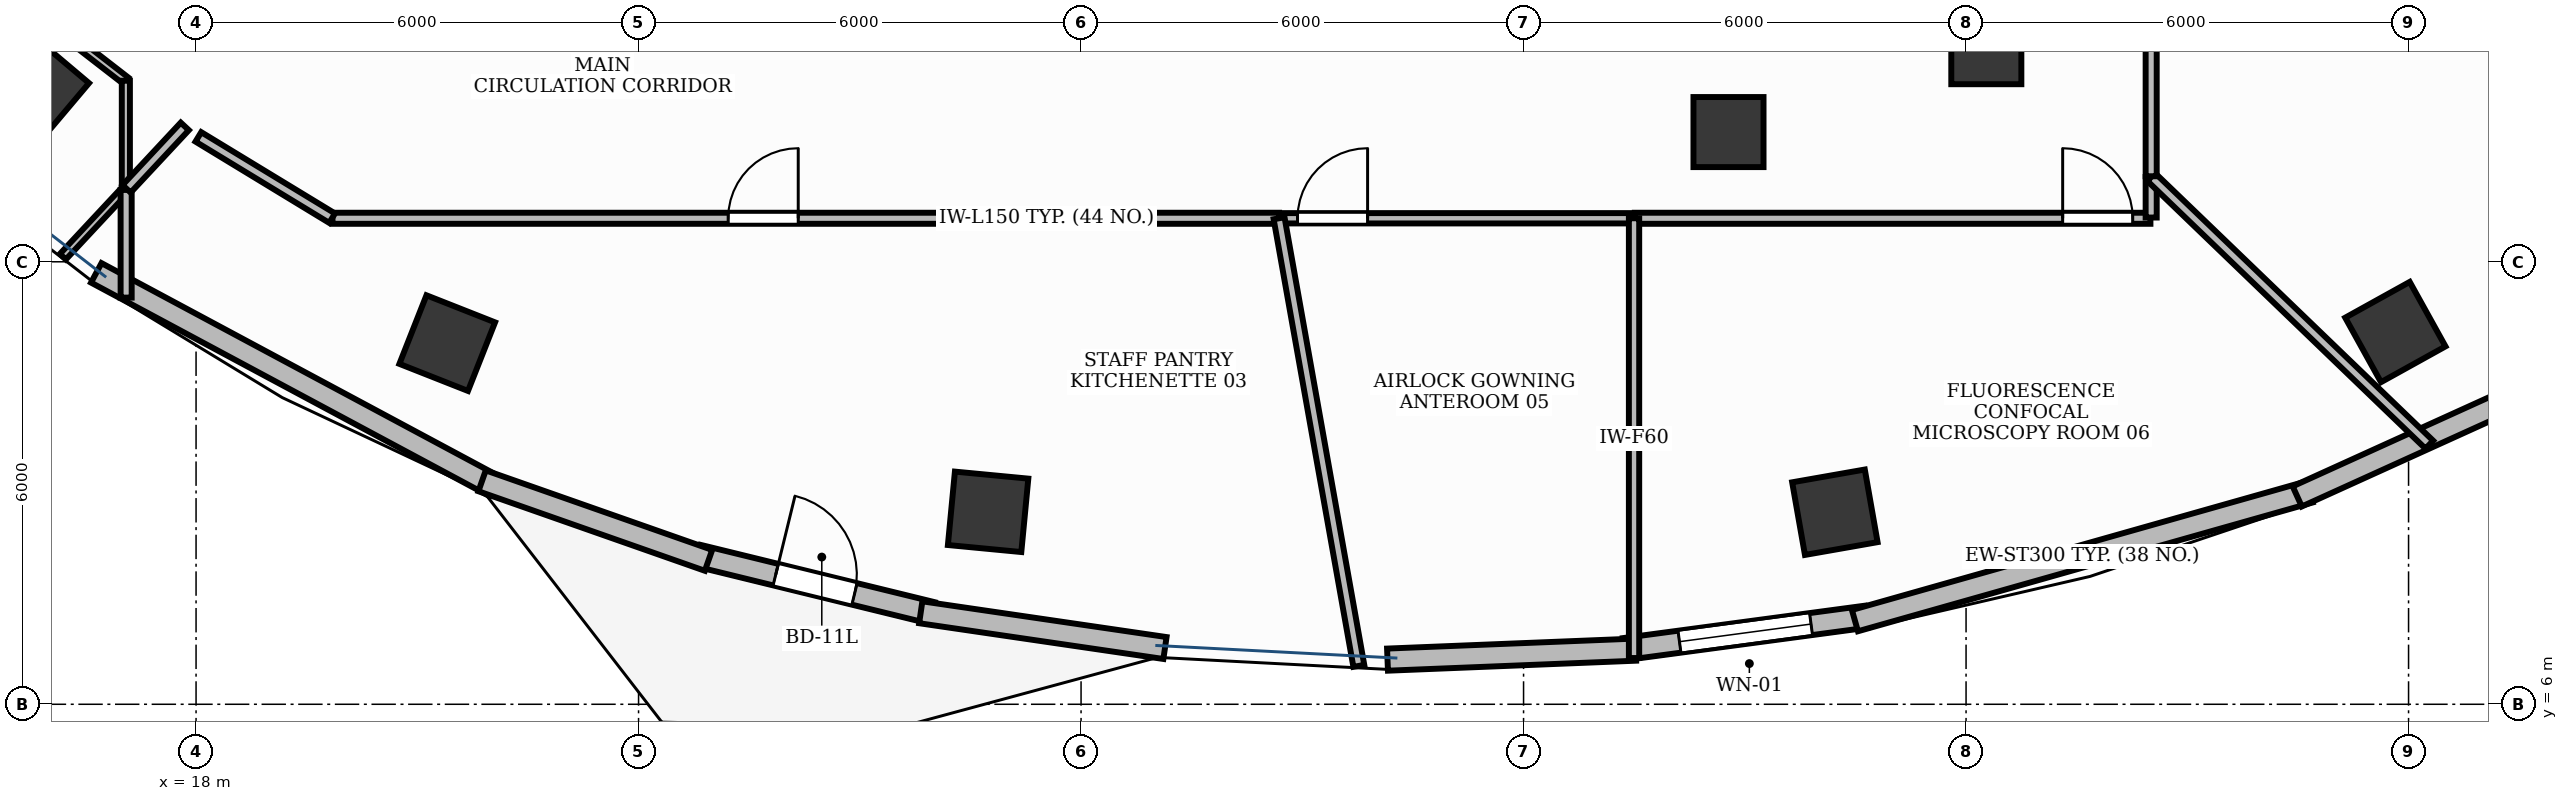
"""IFC4 building model, lengths in metres.
Left out: names, types, materials, properties, quantities, classifications, styles, units other than length and angle.
Written with IfcOpenShell. Run it as: python <this file> out.ifc"""

import sys

from ifc_helpers import new_model, si_unit, direction, frame, frame_2d, origin, origin_2d, place, context, subcontext, project, spatial, rectangle, extrude, element, fill, save


model = new_model("IFC4")
c1 = context("Model", 3, precision=1e-05, world=origin(), true_north=direction((0.0, 1.0)))
c2 = subcontext(c1, "Body", "Model", "MODEL_VIEW")
j1 = project(units=[si_unit("LENGTHUNIT", "METRE"), si_unit("PLANEANGLEUNIT", "RADIAN")], contexts=[c1])
p1 = place(None, origin())
s1 = spatial("IfcSite", under=j1, at=p1, CompositionType="ELEMENT")
p2 = place(p1, origin())
s2 = spatial("IfcBuilding", under=s1, at=p2, CompositionType="ELEMENT")
p3 = place(p2, frame((0.0, 0.0, 158.4)))
s3 = spatial("IfcBuildingStorey", under=s2, at=p3, CompositionType="ELEMENT", Elevation=158.4)
for number, where, z_axis, x_axis in (
    (1, (15.844, 14.363, -0.0), (0.0, 0.0, 1.0), (-0.764, 0.645, 0.0)),
    (2, (21.406, 10.897, -0.0), (0.0, 0.0, 1.0), (-0.93, 0.367, 0.0)),
    (3, (28.74, 8.61, -0.0), (0.0, 0.0, 1.0), (-0.995, 0.095, 0.0)),
    (4, (40.221, 8.604, -0.0), (0.0, 0.0, 1.0), (0.985, 0.173, 0.0)),
):
    element("IfcColumn", number, at=place(p3, frame(where, z_axis=z_axis, x_axis=x_axis)), inside=s3, PredefinedType="COLUMN", context=c2, shape_type="SweptSolid", body=[
        extrude(rectangle(XDim=1.0, YDim=1.0, at=origin_2d()), origin(), (0.0, 0.0, 1.0), 3.901),
    ])
p4 = place(p3, frame((38.779, 13.759, -0.0), z_axis=(0.0, 0.0, 1.0), x_axis=(1.0, 0.0, 0.0)))
e5 = element("IfcColumn", 5, at=p4, inside=s3, PredefinedType="COLUMN", context=c2, shape_type="SweptSolid", body=[
    extrude(rectangle(XDim=0.95, YDim=0.95, at=origin_2d()), origin(), (0.0, 0.0, 1.0), 3.901),
])
p5 = place(p3, frame((47.821, 11.047, -0.0), z_axis=(0.0, 0.0, 1.0), x_axis=(0.874535078577, 0.484962262797, 0.0)))
e6 = element("IfcColumn", 6, at=p5, inside=s3, PredefinedType="COLUMN", context=c2, shape_type="SweptSolid", body=[
    extrude(rectangle(XDim=1.0, YDim=1.0, at=origin_2d()), origin(), (0.0, 0.0, 1.0), 3.901),
])
p6 = place(p3, frame((42.275, 14.883, -0.0), z_axis=(0.0, 0.0, 1.0), x_axis=(1.0, 0.0, 0.0)))
e7 = element("IfcColumn", 7, at=p6, inside=s3, PredefinedType="COLUMN", context=c2, shape_type="SweptSolid", body=[
    extrude(rectangle(XDim=0.95, YDim=0.95, at=origin_2d()), origin(), (0.0, 0.0, 1.0), 3.901),
])
p7 = place(p3, frame((24.807, 8.016, 0.0), z_axis=(0.0, 0.0, 1.0), x_axis=(0.971312804689, -0.237805457142, 0.0)))
e8 = element("IfcWall", 8, at=p7, inside=s3, PredefinedType="STANDARD", context=c2, shape_type="SweptSolid", body=[
    extrude(rectangle(XDim=3.269, YDim=0.3, at=frame_2d((1.634, 0.0))), origin(), (0.0, 0.0, 1.0), 3.9),
])
p8 = place(p7, frame((1.084, 0.0, 0.0)))
e9 = element("IfcOpeningElement", 9, at=p8, cuts=e8, PredefinedType="OPENING", context=c2, shape_type="SweptSolid", body=[
    extrude(rectangle(XDim=1.1, YDim=2.15, at=frame_2d((0.55, 1.075))), frame((0.0, 0.165, 0.0), z_axis=(0.0, -1.0, 0.0), x_axis=(1.0, 0.0, 0.0)), (0.0, 0.0, 1.0), 0.33),
])
p9 = place(p3, frame((37.365, 6.748, 0.0), z_axis=(0.0, 0.0, 1.0), x_axis=(0.991139436205, 0.132825517122, 0.0)))
e10 = element("IfcWall", 10, at=p9, inside=s3, PredefinedType="STANDARD", context=c2, shape_type="SweptSolid", body=[
    extrude(rectangle(XDim=3.31, YDim=0.3, at=frame_2d((1.655, 0.0))), origin(), (0.0, 0.0, 1.0), 3.9),
])
p10 = place(p9, frame((0.755, 0.0, 0.9)))
e11 = element("IfcOpeningElement", 11, at=p10, cuts=e10, PredefinedType="OPENING", context=c2, shape_type="SweptSolid", body=[
    extrude(rectangle(XDim=1.8, YDim=2.1, at=frame_2d((0.9, 1.05))), frame((0.0, 0.165, 0.0), z_axis=(0.0, -1.0, 0.0), x_axis=(1.0, 0.0, 0.0)), (0.0, 0.0, 1.0), 0.33),
])
p11 = place(p3, frame((16.647, 11.85, 0.0), z_axis=(0.0, 0.0, 1.0), x_axis=(0.881364369565, -0.472437136624, 0.0)))
e12 = element("IfcWall", 12, at=p11, inside=s3, PredefinedType="STANDARD", context=c2, shape_type="SweptSolid", body=[
    extrude(rectangle(XDim=6.124, YDim=0.3, at=frame_2d((3.062, 0.0))), origin(), (0.0, 0.0, 1.0), 3.47),
])
p12 = place(p3, frame((21.878, 9.03, 0.0), z_axis=(0.0, 0.0, 1.0), x_axis=(0.94352100271, -0.331312718509, 0.0)))
e13 = element("IfcWall", 13, at=p12, inside=s3, PredefinedType="STANDARD", context=c2, shape_type="SweptSolid", body=[
    extrude(rectangle(XDim=3.254, YDim=0.3, at=frame_2d((1.627, 0.0))), origin(), (0.0, 0.0, 1.0), 3.47),
])
p13 = place(p3, frame((27.826, 7.247, 0.0), z_axis=(0.0, 0.0, 1.0), x_axis=(0.98945927954, -0.144811374319, 0.0)))
e14 = element("IfcWall", 14, at=p13, inside=s3, PredefinedType="STANDARD", context=c2, shape_type="SweptSolid", body=[
    extrude(rectangle(XDim=3.346, YDim=0.3, at=frame_2d((1.673, 0.0))), origin(), (0.0, 0.0, 1.0), 3.47),
])
p14 = place(p3, frame((34.155, 6.605, 0.0), z_axis=(0.0, 0.0, 1.0), x_axis=(0.999190386434, 0.040231475948, 0.0)))
e15 = element("IfcWall", 15, at=p14, inside=s3, PredefinedType="STANDARD", context=c2, shape_type="SweptSolid", body=[
    extrude(rectangle(XDim=3.368, YDim=0.3, at=frame_2d((1.684, 0.0))), origin(), (0.0, 0.0, 1.0), 3.9),
])
p15 = place(p3, frame((40.493, 7.134, 0.0), z_axis=(0.0, 0.0, 1.0), x_axis=(0.962163849422, 0.272471515694, 0.0)))
e16 = element("IfcWall", 16, at=p15, inside=s3, PredefinedType="STANDARD", context=c2, shape_type="SweptSolid", body=[
    extrude(rectangle(XDim=6.409, YDim=0.3, at=frame_2d((3.205, 0.0))), origin(), (0.0, 0.0, 1.0), 3.9),
])
p16 = place(p3, frame((46.49, 8.818, 0.0), z_axis=(0.0, 0.0, 1.0), x_axis=(0.910633193525, 0.413215666268, 0.0)))
e17 = element("IfcWall", 17, at=p16, inside=s3, PredefinedType="STANDARD", context=c2, shape_type="SweptSolid", body=[
    extrude(rectangle(XDim=3.195, YDim=0.3, at=frame_2d((1.598, 0.0))), origin(), (0.0, 0.0, 1.0), 3.9),
])
p17 = place(p3, frame((19.85, 12.59, 0.0), z_axis=(0.0, 0.0, 1.0), x_axis=(1.0, 0.0, 0.0)))
e18 = element("IfcWall", 18, at=p17, inside=s3, PredefinedType="PARTITIONING", context=c2, shape_type="SweptSolid", body=[
    extrude(rectangle(XDim=12.835, YDim=0.15, at=frame_2d((6.418, 0.0))), origin(), (0.0, 0.0, 1.0), 2.91),
])
p18 = place(p17, frame((5.365, 0.0, 0.0)))
e19 = element("IfcOpeningElement", 19, at=p18, cuts=e18, PredefinedType="OPENING", context=c2, shape_type="SweptSolid", body=[
    extrude(rectangle(XDim=0.95, YDim=2.15, at=frame_2d((0.475, 1.075))), frame((0.0, 0.09, 0.0), z_axis=(0.0, -1.0, 0.0), x_axis=(1.0, 0.0, 0.0)), (0.0, 0.0, 1.0), 0.18),
])
p19 = place(p3, frame((32.695, 12.59, 0.0), z_axis=(0.0, 0.0, 1.0), x_axis=(1.0, 0.0, 0.0)))
e20 = element("IfcWall", 20, at=p19, inside=s3, PredefinedType="PARTITIONING", context=c2, shape_type="SweptSolid", body=[
    extrude(rectangle(XDim=4.803, YDim=0.14, at=frame_2d((2.401, 0.0))), origin(), (0.0, 0.0, 1.0), 2.91),
])
p20 = place(p19, frame((0.24, 0.0, 0.0)))
e21 = element("IfcOpeningElement", 21, at=p20, cuts=e20, PredefinedType="OPENING", context=c2, shape_type="SweptSolid", body=[
    extrude(rectangle(XDim=0.95, YDim=2.15, at=frame_2d((0.475, 1.075))), frame((0.0, 0.085, 0.0), z_axis=(0.0, -1.0, 0.0), x_axis=(1.0, 0.0, 0.0)), (0.0, 0.0, 1.0), 0.17),
])
p21 = place(p3, frame((37.508, 12.59, 0.0), z_axis=(0.0, 0.0, 1.0), x_axis=(1.0, 0.0, 0.0)))
e22 = element("IfcWall", 22, at=p21, inside=s3, PredefinedType="PARTITIONING", context=c2, shape_type="SweptSolid", body=[
    extrude(rectangle(XDim=6.992, YDim=0.15, at=frame_2d((3.496, 0.0))), origin(), (0.0, 0.0, 1.0), 2.91),
])
p22 = place(p21, frame((5.802, 0.0, 0.0)))
e23 = element("IfcOpeningElement", 23, at=p22, cuts=e22, PredefinedType="OPENING", context=c2, shape_type="SweptSolid", body=[
    extrude(rectangle(XDim=0.95, YDim=2.15, at=frame_2d((0.475, 1.075))), frame((0.0, 0.09, 0.0), z_axis=(0.0, -1.0, 0.0), x_axis=(1.0, 0.0, 0.0)), (0.0, 0.0, 1.0), 0.18),
])
p23 = place(p3, frame((15.995, 15.271, 0.0), z_axis=(0.0, 0.0, 1.0), x_axis=(0.790603531082, -0.612328389543, 0.0)))
e24 = element("IfcWall", 24, at=p23, inside=s3, PredefinedType="MOVABLE", context=c2, shape_type="SweptSolid", body=[
    extrude(rectangle(XDim=1.333, YDim=0.11, at=frame_2d((0.666, 0.0))), origin(), (0.0, 0.0, 1.0), 2.91),
])
p24 = place(p3, frame((17.048, 14.455, 0.0), z_axis=(0.0, 0.0, 1.0), x_axis=(0.0, -1.0, 0.0)))
e25 = element("IfcWall", 25, at=p24, inside=s3, PredefinedType="MOVABLE", context=c2, shape_type="SweptSolid", body=[
    extrude(rectangle(XDim=1.47, YDim=0.11, at=frame_2d((0.735, 0.0))), origin(), (0.0, 0.0, 1.0), 2.91),
])
p25 = place(p3, frame((17.048, 12.984, 0.0), z_axis=(0.0, 0.0, 1.0), x_axis=(-0.681894093702, -0.731450917679, 0.0)))
e26 = element("IfcWall", 26, at=p25, inside=s3, PredefinedType="MOVABLE", context=c2, shape_type="SweptSolid", body=[
    extrude(rectangle(XDim=1.251, YDim=0.11, at=frame_2d((0.625, 0.0))), origin(), (0.0, 0.0, 1.0), 2.91),
])
p26 = place(p3, frame((18.031, 13.694, 0.0), z_axis=(0.0, 0.0, 1.0), x_axis=(0.85454497186, -0.51937740716, 0.0)))
e27 = element("IfcWall", 27, at=p26, inside=s3, PredefinedType="PARTITIONING", context=c2, shape_type="SweptSolid", body=[
    extrude(rectangle(XDim=2.122, YDim=0.15, at=frame_2d((1.061, 0.0))), origin(), (0.0, 0.0, 1.0), 2.91),
])
p27 = place(p3, frame((32.685, 12.59, 0.0), z_axis=(0.0, 0.0, 1.0), x_axis=(0.175350659772, -0.984506041687, 0.0)))
e28 = element("IfcWall", 28, at=p27, inside=s3, PredefinedType="PARTITIONING", context=c2, shape_type="SweptSolid", body=[
    extrude(rectangle(XDim=6.165, YDim=0.15, at=frame_2d((3.083, 0.0))), origin(), (0.0, 0.0, 1.0), 2.91),
])
p28 = place(p3, frame((17.052, 11.514, 0.0), z_axis=(0.0, 0.0, 1.0), x_axis=(0.0, 1.0, 0.0)))
e29 = element("IfcWall", 29, at=p28, inside=s3, PredefinedType="PARTITIONING", context=c2, shape_type="SweptSolid", body=[
    extrude(rectangle(XDim=1.46, YDim=0.15, at=frame_2d((0.73, 0.0))), origin(), (0.0, 0.0, 1.0), 2.91),
])
p29 = place(p3, frame((17.058, 12.99, 0.0), z_axis=(0.0, 0.0, 1.0), x_axis=(0.681994997266, 0.731356837464, 0.0)))
e30 = element("IfcWall", 30, at=p29, inside=s3, PredefinedType="PARTITIONING", context=c2, shape_type="SweptSolid", body=[
    extrude(rectangle(XDim=1.157, YDim=0.15, at=frame_2d((0.579, 0.0))), origin(), (0.0, 0.0, 1.0), 2.91),
])
p30 = place(p3, frame((37.498, 12.59, 0.0), z_axis=(0.0, 0.0, 1.0), x_axis=(0.0, -1.0, 0.0)))
e31 = element("IfcWall", 31, at=p30, inside=s3, PredefinedType="PARTITIONING", context=c2, shape_type="SweptSolid", body=[
    extrude(rectangle(XDim=5.963, YDim=0.14, at=frame_2d((2.981, 0.0))), origin(), (0.0, 0.0, 1.0), 2.91),
])
p31 = place(p3, frame((44.51, 12.6, 0.0), z_axis=(0.0, 0.0, 1.0), x_axis=(0.0, 1.0, 0.0)))
e32 = element("IfcWall", 32, at=p31, inside=s3, PredefinedType="PARTITIONING", context=c2, shape_type="SweptSolid", body=[
    extrude(rectangle(XDim=0.55, YDim=0.15, at=frame_2d((0.275, 0.0))), origin(), (0.0, 0.0, 1.0), 2.91),
])
p32 = place(p3, frame((44.51, 13.15, 0.0), z_axis=(0.0, 0.0, 1.0), x_axis=(0.720549773239, -0.69340321912, 0.0)))
e33 = element("IfcWall", 33, at=p32, inside=s3, PredefinedType="PARTITIONING", context=c2, shape_type="SweptSolid", body=[
    extrude(rectangle(XDim=5.234, YDim=0.15, at=frame_2d((2.617, 0.0))), origin(), (0.0, 0.0, 1.0), 2.91),
])
p33 = place(p3, frame((44.51, 13.16, 0.0), z_axis=(0.0, 0.0, 1.0), x_axis=(0.0, 1.0, 0.0)))
e34 = element("IfcWall", 34, at=p33, inside=s3, PredefinedType="PARTITIONING", context=c2, shape_type="SweptSolid", body=[
    extrude(rectangle(XDim=3.24, YDim=0.15, at=frame_2d((1.62, 0.0))), origin(), (0.0, 0.0, 1.0), 2.91),
])
p34 = place(p8, origin())
e35 = element("IfcDoor", 35, at=p34, inside=s3, OperationType="SINGLE_SWING_LEFT", PredefinedType="DOOR", context=c2, shape_type="SweptSolid", body=[
    extrude(rectangle(XDim=1.1, YDim=2.15, at=frame_2d((0.55, 1.075))), frame((0.0, 0.025, 0.0), z_axis=(0.0, -1.0, 0.0), x_axis=(1.0, 0.0, 0.0)), (0.0, 0.0, 1.0), 0.05),
])
fill(e9, e35)
p35 = place(p10, origin())
e36 = element("IfcWindow", 36, at=p35, inside=s3, PartitioningType="SINGLE_PANEL", PredefinedType="WINDOW", context=c2, shape_type="SweptSolid", body=[
    extrude(rectangle(XDim=1.8, YDim=2.1, at=frame_2d((0.9, 1.05))), frame((0.0, 0.03, 0.0), z_axis=(0.0, -1.0, 0.0), x_axis=(1.0, 0.0, 0.0)), (0.0, 0.0, 1.0), 0.06),
])
fill(e11, e36)
p36 = place(p18, origin())
e37 = element("IfcDoor", 37, at=p36, inside=s3, OperationType="SINGLE_SWING_RIGHT", PredefinedType="DOOR", context=c2, shape_type="SweptSolid", body=[
    extrude(rectangle(XDim=0.95, YDim=2.15, at=frame_2d((0.475, 1.075))), frame((0.0, 0.025, 0.0), z_axis=(0.0, -1.0, 0.0), x_axis=(1.0, 0.0, 0.0)), (0.0, 0.0, 1.0), 0.05),
])
fill(e19, e37)
p37 = place(p20, origin())
e38 = element("IfcDoor", 38, at=p37, inside=s3, OperationType="SINGLE_SWING_RIGHT", PredefinedType="DOOR", context=c2, shape_type="SweptSolid", body=[
    extrude(rectangle(XDim=0.95, YDim=2.15, at=frame_2d((0.475, 1.075))), frame((0.0, 0.025, 0.0), z_axis=(0.0, -1.0, 0.0), x_axis=(1.0, 0.0, 0.0)), (0.0, 0.0, 1.0), 0.05),
])
fill(e21, e38)
p38 = place(p22, origin())
e39 = element("IfcDoor", 39, at=p38, inside=s3, OperationType="SINGLE_SWING_LEFT", PredefinedType="DOOR", context=c2, shape_type="SweptSolid", body=[
    extrude(rectangle(XDim=0.95, YDim=2.15, at=frame_2d((0.475, 1.075))), frame((0.0, 0.025, 0.0), z_axis=(0.0, -1.0, 0.0), x_axis=(1.0, 0.0, 0.0)), (0.0, 0.0, 1.0), 0.05),
])
fill(e23, e39)
save(model, sys.argv[1])
